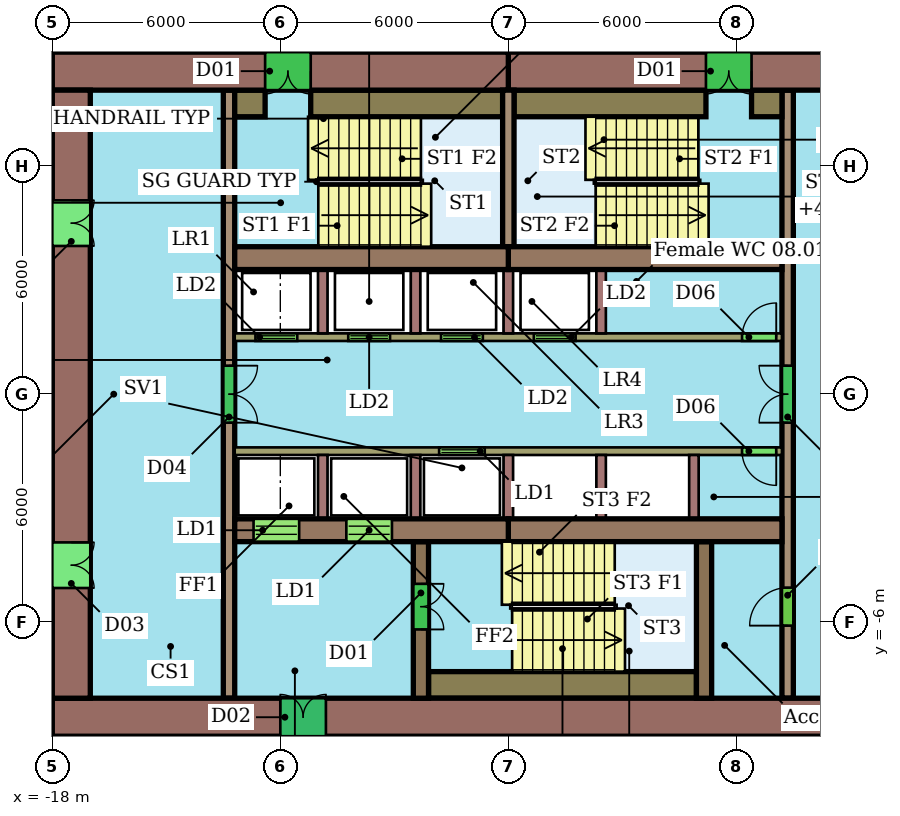
"""IFC4 building model, lengths in metres.
Left out: names, types, materials, properties, quantities, classifications, styles, units other than length and angle.
Written with IfcOpenShell. Run it as: python <this file> out.ifc"""

import sys

from ifc_helpers import new_model, si_unit, direction, frame, frame_2d, origin, place, context, subcontext, project, spatial, rectangle, extrude, element, fill, save


model = new_model("IFC4")
c1 = context("Model", 3, precision=1e-05, world=origin(), true_north=direction((0.0, 1.0)))
c2 = subcontext(c1, "Body", "Model", "MODEL_VIEW")
j1 = project(units=[si_unit("LENGTHUNIT", "METRE"), si_unit("PLANEANGLEUNIT", "RADIAN")], contexts=[c1])
p1 = place(None, origin())
s1 = spatial("IfcSite", under=j1, at=p1, CompositionType="ELEMENT")
p2 = place(p1, origin())
s2 = spatial("IfcBuilding", under=s1, at=p2, CompositionType="ELEMENT")
p3 = place(p2, frame((0.0, 0.0, 47.1)))
s3 = spatial("IfcBuildingStorey", under=s2, at=p3, CompositionType="ELEMENT", Elevation=47.1)
p4 = place(p3, frame((6.0, 8.5, 0.0), z_axis=(0.0, 0.0, 1.0), x_axis=(-1.0, 0.0, 0.0)))
e1 = element("IfcWall", 1, at=p4, inside=s3, PredefinedType="SHEAR", context=c2, shape_type="SweptSolid", body=[
    extrude(rectangle(XDim=12.0, YDim=1.0, at=frame_2d((6.0, 0.0))), origin(), (0.0, 0.0, 1.0), 3.4),
])
p5 = place(p4, frame((5.6, 0.0, 0.0)))
e2 = element("IfcOpeningElement", 2, at=p5, cuts=e1, PredefinedType="OPENING", context=c2, shape_type="SweptSolid", body=[
    extrude(rectangle(XDim=1.2, YDim=2.1, at=frame_2d((0.6, 1.05))), frame((0.0, 0.51, 0.0), z_axis=(0.0, -1.0, 0.0), x_axis=(1.0, 0.0, 0.0)), (0.0, 0.0, 1.0), 1.02),
])
p6 = place(p3, frame((-6.0, 8.5, 0.0), z_axis=(0.0, 0.0, 1.0), x_axis=(-1.0, 0.0, 0.0)))
e3 = element("IfcWall", 3, at=p6, inside=s3, PredefinedType="SHEAR", context=c2, shape_type="SweptSolid", body=[
    extrude(rectangle(XDim=12.0, YDim=1.0, at=frame_2d((6.0, 0.0))), origin(), (0.0, 0.0, 1.0), 3.4),
])
p7 = place(p6, frame((5.2, 0.0, 0.0)))
e4 = element("IfcOpeningElement", 4, at=p7, cuts=e3, PredefinedType="OPENING", context=c2, shape_type="SweptSolid", body=[
    extrude(rectangle(XDim=1.2, YDim=2.1, at=frame_2d((0.6, 1.05))), frame((0.0, 0.51, 0.0), z_axis=(0.0, -1.0, 0.0), x_axis=(1.0, 0.0, 0.0)), (0.0, 0.0, 1.0), 1.02),
])
p8 = place(p3, frame((-18.0, -8.5, 0.0), z_axis=(0.0, 0.0, 1.0), x_axis=(1.0, 0.0, 0.0)))
e5 = element("IfcWall", 5, at=p8, inside=s3, PredefinedType="SHEAR", context=c2, shape_type="SweptSolid", body=[
    extrude(rectangle(XDim=24.0, YDim=1.0, at=frame_2d((12.0, 0.0))), origin(), (0.0, 0.0, 1.0), 3.4),
])
p9 = place(p8, frame((6.0, 0.0, 0.0)))
e6 = element("IfcOpeningElement", 6, at=p9, cuts=e5, PredefinedType="OPENING", context=c2, shape_type="SweptSolid", body=[
    extrude(rectangle(XDim=1.2, YDim=2.1, at=frame_2d((0.6, 1.05))), frame((0.0, 0.51, 0.0), z_axis=(0.0, -1.0, 0.0), x_axis=(1.0, 0.0, 0.0)), (0.0, 0.0, 1.0), 1.02),
])
p10 = place(p3, frame((-17.5, 8.0, 0.0), z_axis=(0.0, 0.0, 1.0), x_axis=(0.0, -1.0, 0.0)))
e7 = element("IfcWall", 7, at=p10, inside=s3, PredefinedType="SHEAR", context=c2, shape_type="SweptSolid", body=[
    extrude(rectangle(XDim=16.0, YDim=1.0, at=frame_2d((8.0, 0.0))), origin(), (0.0, 0.0, 1.0), 3.4),
])
p11 = place(p10, frame((11.9, 0.0, 0.0)))
e8 = element("IfcOpeningElement", 8, at=p11, cuts=e7, PredefinedType="OPENING", context=c2, shape_type="SweptSolid", body=[
    extrude(rectangle(XDim=1.2, YDim=2.1, at=frame_2d((0.6, 1.05))), frame((0.0, 0.51, 0.0), z_axis=(0.0, -1.0, 0.0), x_axis=(1.0, 0.0, 0.0)), (0.0, 0.0, 1.0), 1.02),
])
p12 = place(p10, frame((2.9, 0.0, 0.0)))
e9 = element("IfcOpeningElement", 9, at=p12, cuts=e7, PredefinedType="OPENING", context=c2, shape_type="SweptSolid", body=[
    extrude(rectangle(XDim=1.2, YDim=2.1, at=frame_2d((0.6, 1.05))), frame((0.0, 0.51, 0.0), z_axis=(0.0, -1.0, 0.0), x_axis=(1.0, 0.0, 0.0)), (0.0, 0.0, 1.0), 1.02),
])
for number, where, z_axis, x_axis in (
    (10, (-13.2, 3.58, 0.0), (0.0, 0.0, 1.0), (1.0, 0.0, 0.0)),
    (11, (-6.0, 3.58, 0.0), (0.0, 0.0, 1.0), (1.0, 0.0, 0.0)),
):
    element("IfcWall", number, at=place(p3, frame(where, z_axis=z_axis, x_axis=x_axis)), inside=s3, PredefinedType="SHEAR", context=c2, shape_type="SweptSolid", body=[
        extrude(rectangle(XDim=7.2, YDim=0.6, at=frame_2d((3.6, 0.0))), origin(), (0.0, 0.0, 1.0), 3.4),
    ])
p13 = place(p3, frame((-13.2, -3.58, 0.0), z_axis=(0.0, 0.0, 1.0), x_axis=(1.0, 0.0, 0.0)))
e12 = element("IfcWall", 12, at=p13, inside=s3, PredefinedType="SHEAR", context=c2, shape_type="SweptSolid", body=[
    extrude(rectangle(XDim=7.2, YDim=0.6, at=frame_2d((3.6, 0.0))), origin(), (0.0, 0.0, 1.0), 3.4),
])
p14 = place(p13, frame((0.496, 0.0, 0.0)))
e13 = element("IfcOpeningElement", 13, at=p14, cuts=e12, PredefinedType="OPENING", context=c2, shape_type="SweptSolid", body=[
    extrude(rectangle(XDim=1.2, YDim=2.1, at=frame_2d((0.6, 1.05))), frame((0.0, 0.31, 0.0), z_axis=(0.0, -1.0, 0.0), x_axis=(1.0, 0.0, 0.0)), (0.0, 0.0, 1.0), 0.62),
])
p15 = place(p13, frame((2.938, 0.0, 0.0)))
e14 = element("IfcOpeningElement", 14, at=p15, cuts=e12, PredefinedType="OPENING", context=c2, shape_type="SweptSolid", body=[
    extrude(rectangle(XDim=1.2, YDim=2.1, at=frame_2d((0.6, 1.05))), frame((0.0, 0.31, 0.0), z_axis=(0.0, -1.0, 0.0), x_axis=(1.0, 0.0, 0.0)), (0.0, 0.0, 1.0), 0.62),
])
p16 = place(p3, frame((-6.0, -3.58, 0.0), z_axis=(0.0, 0.0, 1.0), x_axis=(1.0, 0.0, 0.0)))
e15 = element("IfcWall", 15, at=p16, inside=s3, PredefinedType="SHEAR", context=c2, shape_type="SweptSolid", body=[
    extrude(rectangle(XDim=7.2, YDim=0.6, at=frame_2d((3.6, 0.0))), origin(), (0.0, 0.0, 1.0), 3.4),
])
p17 = place(p3, frame((-13.35, 8.0, 0.0), z_axis=(0.0, 0.0, 1.0), x_axis=(0.0, -1.0, 0.0)))
e16 = element("IfcWall", 16, at=p17, inside=s3, PredefinedType="SHEAR", context=c2, shape_type="SweptSolid", body=[
    extrude(rectangle(XDim=16.0, YDim=0.3, at=frame_2d((8.0, 0.0))), origin(), (0.0, 0.0, 1.0), 3.4),
])
p18 = place(p17, frame((7.25, 0.0, 0.0)))
e17 = element("IfcOpeningElement", 17, at=p18, cuts=e16, PredefinedType="OPENING", context=c2, shape_type="SweptSolid", body=[
    extrude(rectangle(XDim=1.5, YDim=2.1, at=frame_2d((0.75, 1.05))), frame((0.0, 0.16, 0.0), z_axis=(0.0, -1.0, 0.0), x_axis=(1.0, 0.0, 0.0)), (0.0, 0.0, 1.0), 0.32),
])
p19 = place(p3, frame((1.35, -8.0, 0.0), z_axis=(0.0, 0.0, 1.0), x_axis=(0.0, 1.0, 0.0)))
e18 = element("IfcWall", 18, at=p19, inside=s3, PredefinedType="SHEAR", context=c2, shape_type="SweptSolid", body=[
    extrude(rectangle(XDim=16.0, YDim=0.3, at=frame_2d((8.0, 0.0))), origin(), (0.0, 0.0, 1.0), 3.4),
])
p20 = place(p19, frame((1.91, 0.0, 0.0)))
e19 = element("IfcOpeningElement", 19, at=p20, cuts=e18, PredefinedType="OPENING", context=c2, shape_type="SweptSolid", body=[
    extrude(rectangle(XDim=1.0, YDim=2.1, at=frame_2d((0.5, 1.05))), frame((0.0, 0.16, 0.0), z_axis=(0.0, -1.0, 0.0), x_axis=(1.0, 0.0, 0.0)), (0.0, 0.0, 1.0), 0.32),
])
p21 = place(p19, frame((7.25, 0.0, 0.0)))
e20 = element("IfcOpeningElement", 20, at=p21, cuts=e18, PredefinedType="OPENING", context=c2, shape_type="SweptSolid", body=[
    extrude(rectangle(XDim=1.5, YDim=2.1, at=frame_2d((0.75, 1.05))), frame((0.0, 0.16, 0.0), z_axis=(0.0, -1.0, 0.0), x_axis=(1.0, 0.0, 0.0)), (0.0, 0.0, 1.0), 0.32),
])
p22 = place(p3, frame((-13.2, 1.5, 0.0), z_axis=(0.0, 0.0, 1.0), x_axis=(1.0, 0.0, 0.0)))
e21 = element("IfcWall", 21, at=p22, inside=s3, PredefinedType="SHEAR", context=c2, shape_type="SweptSolid", body=[
    extrude(rectangle(XDim=14.4, YDim=0.2, at=frame_2d((7.2, 0.0))), origin(), (0.0, 0.0, 1.0), 3.4),
])
p23 = place(p22, frame((0.546, 0.0, 0.0)))
e22 = element("IfcOpeningElement", 22, at=p23, cuts=e21, PredefinedType="OPENING", context=c2, shape_type="SweptSolid", body=[
    extrude(rectangle(XDim=1.1, YDim=2.1, at=frame_2d((0.55, 1.05))), frame((0.0, 0.11, 0.0), z_axis=(0.0, -1.0, 0.0), x_axis=(1.0, 0.0, 0.0)), (0.0, 0.0, 1.0), 0.22),
])
p24 = place(p22, frame((2.988, 0.0, 0.0)))
e23 = element("IfcOpeningElement", 23, at=p24, cuts=e21, PredefinedType="OPENING", context=c2, shape_type="SweptSolid", body=[
    extrude(rectangle(XDim=1.1, YDim=2.1, at=frame_2d((0.55, 1.05))), frame((0.0, 0.11, 0.0), z_axis=(0.0, -1.0, 0.0), x_axis=(1.0, 0.0, 0.0)), (0.0, 0.0, 1.0), 0.22),
])
p25 = place(p22, frame((5.429, 0.0, 0.0)))
e24 = element("IfcOpeningElement", 24, at=p25, cuts=e21, PredefinedType="OPENING", context=c2, shape_type="SweptSolid", body=[
    extrude(rectangle(XDim=1.1, YDim=2.1, at=frame_2d((0.55, 1.05))), frame((0.0, 0.11, 0.0), z_axis=(0.0, -1.0, 0.0), x_axis=(1.0, 0.0, 0.0)), (0.0, 0.0, 1.0), 0.22),
])
p26 = place(p22, frame((7.871, 0.0, 0.0)))
e25 = element("IfcOpeningElement", 25, at=p26, cuts=e21, PredefinedType="OPENING", context=c2, shape_type="SweptSolid", body=[
    extrude(rectangle(XDim=1.1, YDim=2.1, at=frame_2d((0.55, 1.05))), frame((0.0, 0.11, 0.0), z_axis=(0.0, -1.0, 0.0), x_axis=(1.0, 0.0, 0.0)), (0.0, 0.0, 1.0), 0.22),
])
p27 = place(p22, frame((13.35, 0.0, 0.0)))
e26 = element("IfcOpeningElement", 26, at=p27, cuts=e21, PredefinedType="OPENING", context=c2, shape_type="SweptSolid", body=[
    extrude(rectangle(XDim=0.9, YDim=2.1, at=frame_2d((0.45, 1.05))), frame((0.0, 0.11, 0.0), z_axis=(0.0, -1.0, 0.0), x_axis=(1.0, 0.0, 0.0)), (0.0, 0.0, 1.0), 0.22),
])
p28 = place(p3, frame((1.2, -1.5, 0.0), z_axis=(0.0, 0.0, 1.0), x_axis=(-1.0, 0.0, 0.0)))
e27 = element("IfcWall", 27, at=p28, inside=s3, PredefinedType="SHEAR", context=c2, shape_type="SweptSolid", body=[
    extrude(rectangle(XDim=14.4, YDim=0.2, at=frame_2d((7.2, 0.0))), origin(), (0.0, 0.0, 1.0), 3.4),
])
p29 = place(p28, frame((7.821, 0.0, 0.0)))
e28 = element("IfcOpeningElement", 28, at=p29, cuts=e27, PredefinedType="OPENING", context=c2, shape_type="SweptSolid", body=[
    extrude(rectangle(XDim=1.2, YDim=2.1, at=frame_2d((0.6, 1.05))), frame((0.0, 0.11, 0.0), z_axis=(0.0, -1.0, 0.0), x_axis=(1.0, 0.0, 0.0)), (0.0, 0.0, 1.0), 0.22),
])
p30 = place(p28, frame((0.15, 0.0, 0.0)))
e29 = element("IfcOpeningElement", 29, at=p30, cuts=e27, PredefinedType="OPENING", context=c2, shape_type="SweptSolid", body=[
    extrude(rectangle(XDim=0.9, YDim=2.1, at=frame_2d((0.45, 1.05))), frame((0.0, 0.11, 0.0), z_axis=(0.0, -1.0, 0.0), x_axis=(1.0, 0.0, 0.0)), (0.0, 0.0, 1.0), 0.22),
])
p31 = place(p3, frame((-8.3, -3.88, 0.0), z_axis=(0.0, 0.0, 1.0), x_axis=(0.0, -1.0, 0.0)))
e30 = element("IfcWall", 30, at=p31, inside=s3, PredefinedType="SHEAR", context=c2, shape_type="SweptSolid", body=[
    extrude(rectangle(XDim=4.12, YDim=0.4, at=frame_2d((2.06, 0.0))), origin(), (0.0, 0.0, 1.0), 3.4),
])
p32 = place(p31, frame((1.11, 0.0, 0.0)))
e31 = element("IfcOpeningElement", 31, at=p32, cuts=e30, PredefinedType="OPENING", context=c2, shape_type="SweptSolid", body=[
    extrude(rectangle(XDim=1.2, YDim=2.1, at=frame_2d((0.6, 1.05))), frame((0.0, 0.21, 0.0), z_axis=(0.0, -1.0, 0.0), x_axis=(1.0, 0.0, 0.0)), (0.0, 0.0, 1.0), 0.42),
])
p33 = place(p3, frame((-0.85, -3.88, 0.0), z_axis=(0.0, 0.0, 1.0), x_axis=(0.0, -1.0, 0.0)))
e32 = element("IfcWall", 32, at=p33, inside=s3, PredefinedType="SHEAR", context=c2, shape_type="SweptSolid", body=[
    extrude(rectangle(XDim=4.12, YDim=0.4, at=frame_2d((2.06, 0.0))), origin(), (0.0, 0.0, 1.0), 3.4),
])
p34 = place(p3, frame((-6.0, 3.88, 0.0), z_axis=(0.0, 0.0, 1.0), x_axis=(0.0, 1.0, 0.0)))
e33 = element("IfcWall", 33, at=p34, inside=s3, PredefinedType="SHEAR", context=c2, shape_type="SweptSolid", body=[
    extrude(rectangle(XDim=4.12, YDim=0.3, at=frame_2d((2.06, 0.0))), origin(), (0.0, 0.0, 1.0), 3.4),
])
p35 = place(p3, frame((-13.2, 7.65, 0.0), z_axis=(0.0, 0.0, 1.0), x_axis=(1.0, 0.0, 0.0)))
e34 = element("IfcWall", 34, at=p35, inside=s3, PredefinedType="SHEAR", context=c2, shape_type="SweptSolid", body=[
    extrude(rectangle(XDim=0.8, YDim=0.7, at=frame_2d((0.4, 0.0))), origin(), (0.0, 0.0, 1.0), 3.4),
])
for number, where, z_axis, x_axis in (
    (35, (-11.2, 7.65, 0.0), (0.0, 0.0, 1.0), (1.0, 0.0, 0.0)),
    (36, (-5.85, 7.65, 0.0), (0.0, 0.0, 1.0), (1.0, 0.0, 0.0)),
):
    element("IfcWall", number, at=place(p3, frame(where, z_axis=z_axis, x_axis=x_axis)), inside=s3, PredefinedType="SHEAR", context=c2, shape_type="SweptSolid", body=[
        extrude(rectangle(XDim=5.05, YDim=0.7, at=frame_2d((2.525, 0.0))), origin(), (0.0, 0.0, 1.0), 3.4),
    ])
p36 = place(p3, frame((0.4, 7.65, 0.0), z_axis=(0.0, 0.0, 1.0), x_axis=(1.0, 0.0, 0.0)))
e37 = element("IfcWall", 37, at=p36, inside=s3, PredefinedType="SHEAR", context=c2, shape_type="SweptSolid", body=[
    extrude(rectangle(XDim=0.8, YDim=0.7, at=frame_2d((0.4, 0.0))), origin(), (0.0, 0.0, 1.0), 3.4),
])
p37 = place(p3, frame((-8.1, -7.65, 0.0), z_axis=(0.0, 0.0, 1.0), x_axis=(1.0, 0.0, 0.0)))
e38 = element("IfcWall", 38, at=p37, inside=s3, PredefinedType="SHEAR", context=c2, shape_type="SweptSolid", body=[
    extrude(rectangle(XDim=7.05, YDim=0.7, at=frame_2d((3.525, 0.0))), origin(), (0.0, 0.0, 1.0), 3.4),
])
for number, where, z_axis, x_axis in (
    (39, (-10.883, 1.6, 0.0), (0.0, 0.0, 1.0), (0.0, 1.0, 0.0)),
    (40, (-8.442, 1.6, 0.0), (0.0, 0.0, 1.0), (0.0, 1.0, 0.0)),
    (41, (-6.0, 1.6, 0.0), (0.0, 0.0, 1.0), (0.0, 1.0, 0.0)),
    (42, (-3.558, 1.6, 0.0), (0.0, 0.0, 1.0), (0.0, 1.0, 0.0)),
    (43, (-10.883, -1.6, 0.0), (0.0, 0.0, 1.0), (0.0, -1.0, 0.0)),
    (44, (-8.442, -1.6, 0.0), (0.0, 0.0, 1.0), (0.0, -1.0, 0.0)),
    (45, (-6.0, -1.6, 0.0), (0.0, 0.0, 1.0), (0.0, -1.0, 0.0)),
    (46, (-3.558, -1.6, 0.0), (0.0, 0.0, 1.0), (0.0, -1.0, 0.0)),
    (47, (-1.117, -1.6, 0.0), (0.0, 0.0, 1.0), (0.0, -1.0, 0.0)),
):
    element("IfcWall", number, at=place(p3, frame(where, z_axis=z_axis, x_axis=x_axis)), inside=s3, PredefinedType="SHEAR", context=c2, shape_type="SweptSolid", body=[
        extrude(rectangle(XDim=1.68, YDim=0.25, at=frame_2d((0.84, 0.0))), origin(), (0.0, 0.0, 1.0), 3.4),
    ])
p38 = place(p5, origin())
e48 = element("IfcDoor", 48, at=p38, inside=s3, OperationType="DOUBLE_DOOR_SINGLE_SWING", PredefinedType="NOTDEFINED", context=c2, shape_type="SweptSolid", body=[
    extrude(rectangle(XDim=1.2, YDim=2.1, at=frame_2d((0.6, 1.05))), frame((0.0, 0.025, 0.0), z_axis=(0.0, -1.0, 0.0), x_axis=(1.0, 0.0, 0.0)), (0.0, 0.0, 1.0), 0.05),
])
fill(e2, e48)
p39 = place(p7, origin())
e49 = element("IfcDoor", 49, at=p39, inside=s3, OperationType="DOUBLE_DOOR_SINGLE_SWING", PredefinedType="NOTDEFINED", context=c2, shape_type="SweptSolid", body=[
    extrude(rectangle(XDim=1.2, YDim=2.1, at=frame_2d((0.6, 1.05))), frame((0.0, 0.025, 0.0), z_axis=(0.0, -1.0, 0.0), x_axis=(1.0, 0.0, 0.0)), (0.0, 0.0, 1.0), 0.05),
])
fill(e4, e49)
p40 = place(p9, origin())
e50 = element("IfcDoor", 50, at=p40, inside=s3, OperationType="DOUBLE_DOOR_SINGLE_SWING", PredefinedType="NOTDEFINED", context=c2, shape_type="SweptSolid", body=[
    extrude(rectangle(XDim=1.2, YDim=2.1, at=frame_2d((0.6, 1.05))), frame((0.0, 0.025, 0.0), z_axis=(0.0, -1.0, 0.0), x_axis=(1.0, 0.0, 0.0)), (0.0, 0.0, 1.0), 0.05),
])
fill(e6, e50)
p41 = place(p11, origin())
e51 = element("IfcDoor", 51, at=p41, inside=s3, OperationType="DOUBLE_DOOR_SINGLE_SWING", PredefinedType="NOTDEFINED", context=c2, shape_type="SweptSolid", body=[
    extrude(rectangle(XDim=1.2, YDim=2.1, at=frame_2d((0.6, 1.05))), frame((0.0, 0.025, 0.0), z_axis=(0.0, -1.0, 0.0), x_axis=(1.0, 0.0, 0.0)), (0.0, 0.0, 1.0), 0.05),
])
fill(e8, e51)
p42 = place(p12, origin())
e52 = element("IfcDoor", 52, at=p42, inside=s3, OperationType="DOUBLE_DOOR_SINGLE_SWING", PredefinedType="NOTDEFINED", context=c2, shape_type="SweptSolid", body=[
    extrude(rectangle(XDim=1.2, YDim=2.1, at=frame_2d((0.6, 1.05))), frame((0.0, 0.025, 0.0), z_axis=(0.0, -1.0, 0.0), x_axis=(1.0, 0.0, 0.0)), (0.0, 0.0, 1.0), 0.05),
])
fill(e9, e52)
p43 = place(p14, origin())
e53 = element("IfcDoor", 53, at=p43, inside=s3, OperationType="DOUBLE_DOOR_SLIDING", PredefinedType="NOTDEFINED", context=c2, shape_type="SweptSolid", body=[
    extrude(rectangle(XDim=1.2, YDim=2.1, at=frame_2d((0.6, 1.05))), frame((0.0, 0.025, 0.0), z_axis=(0.0, -1.0, 0.0), x_axis=(1.0, 0.0, 0.0)), (0.0, 0.0, 1.0), 0.05),
])
fill(e13, e53)
p44 = place(p15, origin())
e54 = element("IfcDoor", 54, at=p44, inside=s3, OperationType="DOUBLE_DOOR_SLIDING", PredefinedType="NOTDEFINED", context=c2, shape_type="SweptSolid", body=[
    extrude(rectangle(XDim=1.2, YDim=2.1, at=frame_2d((0.6, 1.05))), frame((0.0, 0.025, 0.0), z_axis=(0.0, -1.0, 0.0), x_axis=(1.0, 0.0, 0.0)), (0.0, 0.0, 1.0), 0.05),
])
fill(e14, e54)
p45 = place(p18, origin())
e55 = element("IfcDoor", 55, at=p45, inside=s3, OperationType="DOUBLE_DOOR_SINGLE_SWING", PredefinedType="NOTDEFINED", context=c2, shape_type="SweptSolid", body=[
    extrude(rectangle(XDim=1.5, YDim=2.1, at=frame_2d((0.75, 1.05))), frame((0.0, 0.025, 0.0), z_axis=(0.0, -1.0, 0.0), x_axis=(1.0, 0.0, 0.0)), (0.0, 0.0, 1.0), 0.05),
])
fill(e17, e55)
p46 = place(p20, origin())
e56 = element("IfcDoor", 56, at=p46, inside=s3, OperationType="SINGLE_SWING_LEFT", PredefinedType="NOTDEFINED", context=c2, shape_type="SweptSolid", body=[
    extrude(rectangle(XDim=1.0, YDim=2.1, at=frame_2d((0.5, 1.05))), frame((0.0, 0.025, 0.0), z_axis=(0.0, -1.0, 0.0), x_axis=(1.0, 0.0, 0.0)), (0.0, 0.0, 1.0), 0.05),
])
fill(e19, e56)
p47 = place(p21, origin())
e57 = element("IfcDoor", 57, at=p47, inside=s3, OperationType="DOUBLE_DOOR_SINGLE_SWING", PredefinedType="NOTDEFINED", context=c2, shape_type="SweptSolid", body=[
    extrude(rectangle(XDim=1.5, YDim=2.1, at=frame_2d((0.75, 1.05))), frame((0.0, 0.025, 0.0), z_axis=(0.0, -1.0, 0.0), x_axis=(1.0, 0.0, 0.0)), (0.0, 0.0, 1.0), 0.05),
])
fill(e20, e57)
p48 = place(p23, origin())
e58 = element("IfcDoor", 58, at=p48, inside=s3, OperationType="DOUBLE_DOOR_SLIDING", PredefinedType="NOTDEFINED", context=c2, shape_type="SweptSolid", body=[
    extrude(rectangle(XDim=1.1, YDim=2.1, at=frame_2d((0.55, 1.05))), frame((0.0, 0.025, 0.0), z_axis=(0.0, -1.0, 0.0), x_axis=(1.0, 0.0, 0.0)), (0.0, 0.0, 1.0), 0.05),
])
fill(e22, e58)
p49 = place(p24, origin())
e59 = element("IfcDoor", 59, at=p49, inside=s3, OperationType="DOUBLE_DOOR_SLIDING", PredefinedType="NOTDEFINED", context=c2, shape_type="SweptSolid", body=[
    extrude(rectangle(XDim=1.1, YDim=2.1, at=frame_2d((0.55, 1.05))), frame((0.0, 0.025, 0.0), z_axis=(0.0, -1.0, 0.0), x_axis=(1.0, 0.0, 0.0)), (0.0, 0.0, 1.0), 0.05),
])
fill(e23, e59)
p50 = place(p25, origin())
e60 = element("IfcDoor", 60, at=p50, inside=s3, OperationType="DOUBLE_DOOR_SLIDING", PredefinedType="NOTDEFINED", context=c2, shape_type="SweptSolid", body=[
    extrude(rectangle(XDim=1.1, YDim=2.1, at=frame_2d((0.55, 1.05))), frame((0.0, 0.025, 0.0), z_axis=(0.0, -1.0, 0.0), x_axis=(1.0, 0.0, 0.0)), (0.0, 0.0, 1.0), 0.05),
])
fill(e24, e60)
p51 = place(p26, origin())
e61 = element("IfcDoor", 61, at=p51, inside=s3, OperationType="DOUBLE_DOOR_SLIDING", PredefinedType="NOTDEFINED", context=c2, shape_type="SweptSolid", body=[
    extrude(rectangle(XDim=1.1, YDim=2.1, at=frame_2d((0.55, 1.05))), frame((0.0, 0.025, 0.0), z_axis=(0.0, -1.0, 0.0), x_axis=(1.0, 0.0, 0.0)), (0.0, 0.0, 1.0), 0.05),
])
fill(e25, e61)
p52 = place(p27, origin())
e62 = element("IfcDoor", 62, at=p52, inside=s3, OperationType="SINGLE_SWING_RIGHT", PredefinedType="NOTDEFINED", context=c2, shape_type="SweptSolid", body=[
    extrude(rectangle(XDim=0.9, YDim=2.1, at=frame_2d((0.45, 1.05))), frame((0.0, 0.025, 0.0), z_axis=(0.0, -1.0, 0.0), x_axis=(1.0, 0.0, 0.0)), (0.0, 0.0, 1.0), 0.05),
])
fill(e26, e62)
p53 = place(p29, origin())
e63 = element("IfcDoor", 63, at=p53, inside=s3, OperationType="DOUBLE_DOOR_SLIDING", PredefinedType="NOTDEFINED", context=c2, shape_type="SweptSolid", body=[
    extrude(rectangle(XDim=1.2, YDim=2.1, at=frame_2d((0.6, 1.05))), frame((0.0, 0.025, 0.0), z_axis=(0.0, -1.0, 0.0), x_axis=(1.0, 0.0, 0.0)), (0.0, 0.0, 1.0), 0.05),
])
fill(e28, e63)
p54 = place(p30, origin())
e64 = element("IfcDoor", 64, at=p54, inside=s3, OperationType="SINGLE_SWING_LEFT", PredefinedType="NOTDEFINED", context=c2, shape_type="SweptSolid", body=[
    extrude(rectangle(XDim=0.9, YDim=2.1, at=frame_2d((0.45, 1.05))), frame((0.0, 0.025, 0.0), z_axis=(0.0, -1.0, 0.0), x_axis=(1.0, 0.0, 0.0)), (0.0, 0.0, 1.0), 0.05),
])
fill(e29, e64)
p55 = place(p32, origin())
e65 = element("IfcDoor", 65, at=p55, inside=s3, OperationType="DOUBLE_DOOR_SINGLE_SWING", PredefinedType="NOTDEFINED", context=c2, shape_type="SweptSolid", body=[
    extrude(rectangle(XDim=1.2, YDim=2.1, at=frame_2d((0.6, 1.05))), frame((0.0, 0.025, 0.0), z_axis=(0.0, -1.0, 0.0), x_axis=(1.0, 0.0, 0.0)), (0.0, 0.0, 1.0), 0.05),
])
fill(e31, e65)
save(model, sys.argv[1])
